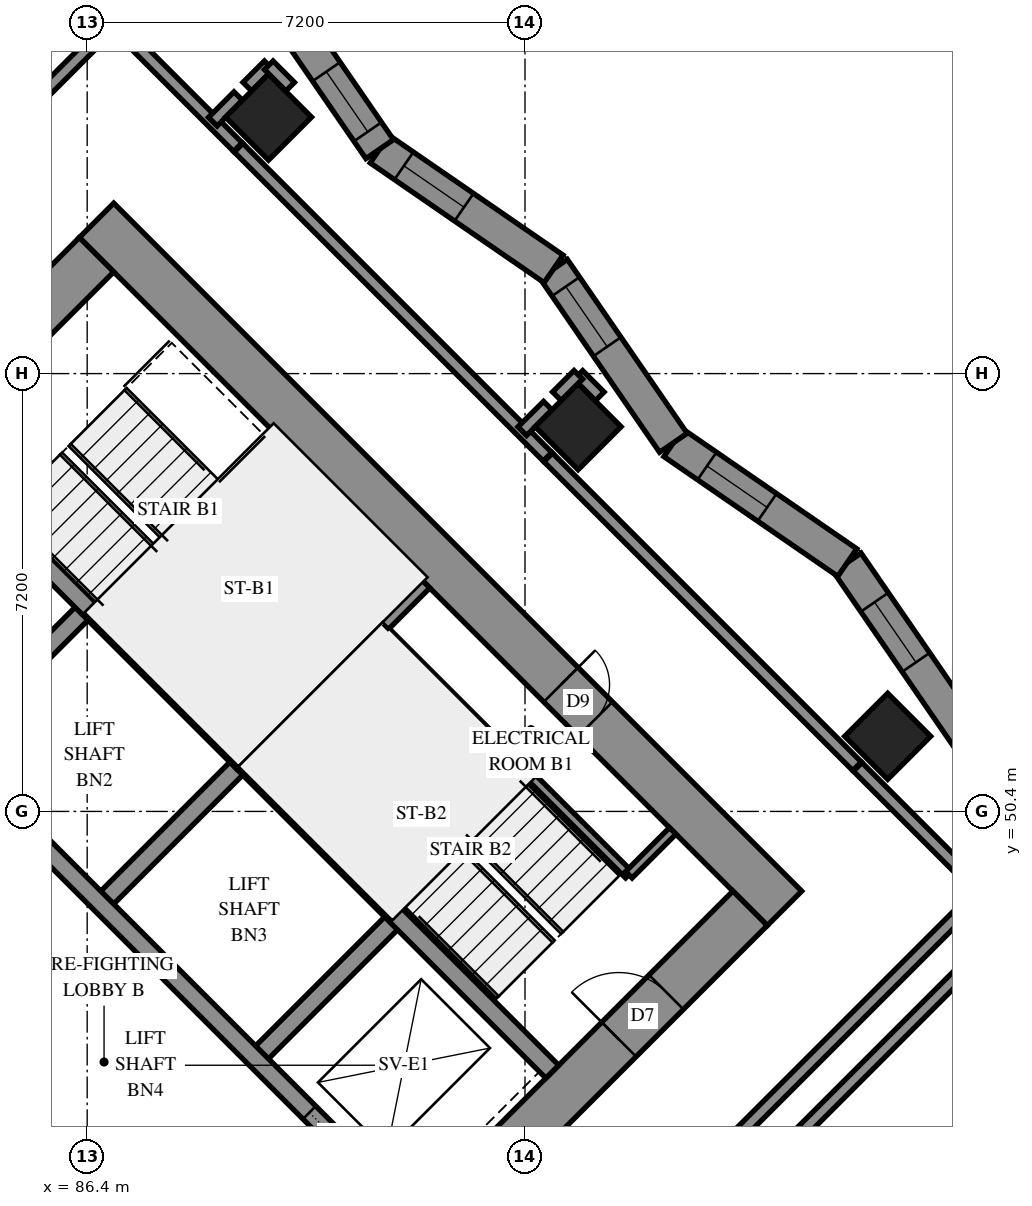
"""IFC4 building model, lengths in metres.
Left out: names, types, materials, properties, quantities, classifications, styles, units other than length and angle.
Written with IfcOpenShell. Run it as: python <this file> out.ifc"""

import sys

from ifc_helpers import new_model, si_unit, direction, frame, frame_2d, origin, origin_2d, place, context, subcontext, project, spatial, polyline, rectangle, outline, extrude, element, fill, save


model = new_model("IFC4")
c1 = context("Model", 3, precision=1e-05, world=origin(), true_north=direction((0.0, 1.0)))
c2 = subcontext(c1, "Body", "Model", "MODEL_VIEW")
j1 = project(units=[si_unit("LENGTHUNIT", "METRE"), si_unit("PLANEANGLEUNIT", "RADIAN")], contexts=[c1])
p1 = place(None, origin())
s1 = spatial("IfcSite", under=j1, at=p1, CompositionType="ELEMENT")
p2 = place(p1, origin())
s2 = spatial("IfcBuilding", under=s1, at=p2, CompositionType="ELEMENT")
p3 = place(p2, frame((0.0, 0.0, 118.6)))
s3 = spatial("IfcBuildingStorey", under=s2, at=p3, CompositionType="ELEMENT", Elevation=118.6)
for number, where, z_axis, x_axis in (
    (1, (89.382, 61.818, 0.0), (0.0, 0.0, 1.0), (0.707, -0.707, 0.0)),
    (2, (94.474, 56.727, 0.0), (0.0, 0.0, 1.0), (0.707, -0.707, 0.0)),
    (3, (99.565, 51.635, 0.0), (0.0, 0.0, 1.0), (0.707, -0.707, 0.0)),
):
    element("IfcColumn", number, at=place(p3, frame(where, z_axis=z_axis, x_axis=x_axis)), inside=s3, PredefinedType="COLUMN", context=c2, shape_type="SweptSolid", body=[
        extrude(rectangle(XDim=1.0, YDim=1.0, at=origin_2d()), origin(), (0.0, 0.0, 1.0), 3.1),
    ])
p4 = place(p3, frame((75.806, 49.373, -0.3), z_axis=(0.0, 0.0, 1.0), x_axis=(0.7071067812, -0.7071067812, 0.0)))
e4 = element("IfcWall", 4, at=p4, inside=s3, PredefinedType="SHEAR", context=c2, shape_type="SweptSolid", body=[
    extrude(rectangle(XDim=16.0, YDim=0.8, at=frame_2d((8.0, 0.0))), origin(), (0.0, 0.0, 1.0), 2.7),
])
p5 = place(p3, frame((86.554, 60.121, -0.3), z_axis=(0.0, 0.0, 1.0), x_axis=(0.7071067812, -0.7071067812, 0.0)))
e5 = element("IfcWall", 5, at=p5, inside=s3, PredefinedType="SHEAR", context=c2, shape_type="SweptSolid", body=[
    extrude(rectangle(XDim=16.0, YDim=0.8, at=frame_2d((8.0, 0.0))), origin(), (0.0, 0.0, 1.0), 2.7),
])
p6 = place(p5, frame((10.8, 0.0, 0.3)))
e6 = element("IfcOpeningElement", 6, at=p6, cuts=e5, PredefinedType="OPENING", context=c2, shape_type="SweptSolid", body=[
    extrude(rectangle(XDim=0.8, YDim=2.1, at=frame_2d((0.4, 1.05))), frame((0.0, 0.41, 0.0), z_axis=(0.0, -1.0, 0.0), x_axis=(1.0, 0.0, 0.0)), (0.0, 0.0, 1.0), 0.82),
])
p7 = place(p3, frame((76.372, 49.373, -0.3), z_axis=(0.0, 0.0, 1.0), x_axis=(0.7071067812, 0.7071067812, 0.0)))
e7 = element("IfcWall", 7, at=p7, inside=s3, PredefinedType="SHEAR", context=c2, shape_type="SweptSolid", body=[
    extrude(rectangle(XDim=14.4, YDim=0.8, at=frame_2d((7.2, 0.0))), origin(), (0.0, 0.0, 1.0), 2.7),
])
p8 = place(p7, frame((4.55, 0.0, 0.3)))
e8 = element("IfcOpeningElement", 8, at=p8, cuts=e7, PredefinedType="OPENING", context=c2, shape_type="SweptSolid", body=[
    extrude(rectangle(XDim=1.1, YDim=2.1, at=frame_2d((0.55, 1.05))), frame((0.0, 0.41, 0.0), z_axis=(0.0, -1.0, 0.0), x_axis=(1.0, 0.0, 0.0)), (0.0, 0.0, 1.0), 0.82),
])
p9 = place(p7, frame((11.35, 0.0, 0.3)))
e9 = element("IfcOpeningElement", 9, at=p9, cuts=e7, PredefinedType="OPENING", context=c2, shape_type="SweptSolid", body=[
    extrude(rectangle(XDim=1.1, YDim=2.1, at=frame_2d((0.55, 1.05))), frame((0.0, 0.41, 0.0), z_axis=(0.0, -1.0, 0.0), x_axis=(1.0, 0.0, 0.0)), (0.0, 0.0, 1.0), 0.82),
])
p10 = place(p3, frame((87.12, 38.625, -0.3), z_axis=(0.0, 0.0, 1.0), x_axis=(0.7071067812, 0.7071067812, 0.0)))
e10 = element("IfcWall", 10, at=p10, inside=s3, PredefinedType="SHEAR", context=c2, shape_type="SweptSolid", body=[
    extrude(rectangle(XDim=14.4, YDim=0.8, at=frame_2d((7.2, 0.0))), origin(), (0.0, 0.0, 1.0), 2.7),
])
p11 = place(p10, frame((4.55, 0.0, 0.3)))
e11 = element("IfcOpeningElement", 11, at=p11, cuts=e10, PredefinedType="OPENING", context=c2, shape_type="SweptSolid", body=[
    extrude(rectangle(XDim=1.1, YDim=2.1, at=frame_2d((0.55, 1.05))), frame((0.0, 0.41, 0.0), z_axis=(0.0, -1.0, 0.0), x_axis=(1.0, 0.0, 0.0)), (0.0, 0.0, 1.0), 0.82),
])
p12 = place(p10, frame((11.35, 0.0, 0.3)))
e12 = element("IfcOpeningElement", 12, at=p12, cuts=e10, PredefinedType="OPENING", context=c2, shape_type="SweptSolid", body=[
    extrude(rectangle(XDim=1.1, YDim=2.1, at=frame_2d((0.55, 1.05))), frame((0.0, 0.41, 0.0), z_axis=(0.0, -1.0, 0.0), x_axis=(1.0, 0.0, 0.0)), (0.0, 0.0, 1.0), 0.82),
])
p13 = place(p3, frame((84.079, 51.423, 0.0), z_axis=(0.0, 0.0, 1.0), x_axis=(0.7071219326, 0.7070916295, 0.0)))
e13 = element("IfcWall", 13, at=p13, inside=s3, PredefinedType="SOLIDWALL", context=c2, shape_type="SweptSolid", body=[
    extrude(rectangle(XDim=3.3, YDim=0.3, at=frame_2d((1.65, 0.0))), origin(), (0.0, 0.0, 1.0), 3.1),
])
for number, where, z_axis, x_axis in (
    (14, (86.625, 48.878, 0.0), (0.0, 0.0, 1.0), (0.707, 0.707, 0.0)),
    (15, (89.17, 46.332, 0.0), (0.0, 0.0, 1.0), (0.707, 0.707, 0.0)),
):
    element("IfcWall", number, at=place(p3, frame(where, z_axis=z_axis, x_axis=x_axis)), inside=s3, PredefinedType="SOLIDWALL", context=c2, shape_type="SweptSolid", body=[
        extrude(rectangle(XDim=3.3, YDim=0.3, at=frame_2d((1.65, 0.0))), origin(), (0.0, 0.0, 1.0), 3.1),
    ])
p14 = place(p3, frame((78.988, 51.423, 0.0), z_axis=(0.0, 0.0, 1.0), x_axis=(0.7071067812, -0.7071067812, 0.0)))
e16 = element("IfcWall", 16, at=p14, inside=s3, PredefinedType="SOLIDWALL", context=c2, shape_type="SweptSolid", body=[
    extrude(rectangle(XDim=14.4, YDim=0.3, at=frame_2d((7.2, 0.0))), origin(), (0.0, 0.0, 1.0), 3.1),
])
p15 = place(p14, frame((1.25, 0.0, 0.0)))
e17 = element("IfcOpeningElement", 17, at=p15, cuts=e16, PredefinedType="OPENING", context=c2, shape_type="SweptSolid", body=[
    extrude(rectangle(XDim=1.1, YDim=2.1, at=frame_2d((0.55, 1.05))), frame((0.0, 0.16, 0.0), z_axis=(0.0, -1.0, 0.0), x_axis=(1.0, 0.0, 0.0)), (0.0, 0.0, 1.0), 0.32),
])
p16 = place(p14, frame((4.85, 0.0, 0.0)))
e18 = element("IfcOpeningElement", 18, at=p16, cuts=e16, PredefinedType="OPENING", context=c2, shape_type="SweptSolid", body=[
    extrude(rectangle(XDim=1.1, YDim=2.1, at=frame_2d((0.55, 1.05))), frame((0.0, 0.16, 0.0), z_axis=(0.0, -1.0, 0.0), x_axis=(1.0, 0.0, 0.0)), (0.0, 0.0, 1.0), 0.32),
])
p17 = place(p14, frame((8.45, 0.0, 0.0)))
e19 = element("IfcOpeningElement", 19, at=p17, cuts=e16, PredefinedType="OPENING", context=c2, shape_type="SweptSolid", body=[
    extrude(rectangle(XDim=1.1, YDim=2.1, at=frame_2d((0.55, 1.05))), frame((0.0, 0.16, 0.0), z_axis=(0.0, -1.0, 0.0), x_axis=(1.0, 0.0, 0.0)), (0.0, 0.0, 1.0), 0.32),
])
p18 = place(p14, frame((12.05, 0.0, 0.0)))
e20 = element("IfcOpeningElement", 20, at=p18, cuts=e16, PredefinedType="OPENING", context=c2, shape_type="SweptSolid", body=[
    extrude(rectangle(XDim=1.1, YDim=2.1, at=frame_2d((0.55, 1.05))), frame((0.0, 0.16, 0.0), z_axis=(0.0, -1.0, 0.0), x_axis=(1.0, 0.0, 0.0)), (0.0, 0.0, 1.0), 0.32),
])
p19 = place(p3, frame((81.534, 53.969, 0.0), z_axis=(0.0, 0.0, 1.0), x_axis=(0.707103309, -0.7071102534, 0.0)))
e21 = element("IfcWall", 21, at=p19, inside=s3, PredefinedType="SOLIDWALL", context=c2, shape_type="SweptSolid", body=[
    extrude(rectangle(XDim=14.4, YDim=0.3, at=frame_2d((7.2, 0.0))), origin(), (0.0, 0.0, 1.0), 3.1),
])
p20 = place(p19, frame((12.05, 0.0, 0.0)))
e22 = element("IfcOpeningElement", 22, at=p20, cuts=e21, PredefinedType="OPENING", context=c2, shape_type="SweptSolid", body=[
    extrude(rectangle(XDim=1.1, YDim=2.1, at=frame_2d((0.55, 1.05))), frame((0.0, 0.16, 0.0), z_axis=(0.0, -1.0, 0.0), x_axis=(1.0, 0.0, 0.0)), (0.0, 0.0, 1.0), 0.32),
])
for number, where, z_axis, x_axis in (
    (23, (83.867, 56.302, 0.0), (0.0, 0.0, 1.0), (0.707, -0.707, 0.0)),
    (24, (88.958, 51.211, 0.0), (0.0, 0.0, 1.0), (0.707, -0.707, 0.0)),
):
    element("IfcWall", number, at=place(p3, frame(where, z_axis=z_axis, x_axis=x_axis)), inside=s3, PredefinedType="SOLIDWALL", context=c2, shape_type="SweptSolid", body=[
        extrude(rectangle(XDim=7.2, YDim=0.3, at=frame_2d((3.6, 0.0))), origin(), (0.0, 0.0, 1.0), 3.1),
    ])
p21 = place(p3, frame((88.958, 51.211, 0.0), z_axis=(0.0, 0.0, 1.0), x_axis=(0.7071067812, 0.7071067812, 0.0)))
e25 = element("IfcWall", 25, at=p21, inside=s3, PredefinedType="SOLIDWALL", context=c2, shape_type="SweptSolid", body=[
    extrude(rectangle(XDim=4.2, YDim=0.3, at=frame_2d((2.1, 0.0))), origin(), (0.0, 0.0, 1.0), 3.1),
])
p22 = place(p3, frame((100.869, 51.632, 0.0), z_axis=(0.0, 0.0, 1.0), x_axis=(-0.5670847596, 0.8236594414, 0.0)))
e26 = element("IfcWall", 26, at=p22, inside=s3, PredefinedType="SOLIDWALL", context=c2, shape_type="SweptSolid", body=[
    extrude(outline(polyline([(0.051, -0.275), (3.523, -0.275), (3.422, 0.275), (-0.051, 0.275), (0.051, -0.275)])), origin(), (0.0, 0.0, 1.0), 3.1),
])
p23 = place(p22, frame((1.481, 0.0, 0.5)))
e27 = element("IfcOpeningElement", 27, at=p23, cuts=e26, PredefinedType="OPENING", context=c2, shape_type="SweptSolid", body=[
    extrude(rectangle(XDim=1.2, YDim=2.45, at=frame_2d((0.6, 1.225))), frame((0.0, 0.285, 0.0), z_axis=(0.0, -1.0, 0.0), x_axis=(1.0, 0.0, 0.0)), (0.0, 0.0, 1.0), 0.57),
])
p24 = place(p3, frame((98.9, 54.492, 0.0), z_axis=(0.0, 0.0, 1.0), x_axis=(-0.8236594414, 0.5670847596, 0.0)))
e28 = element("IfcWall", 28, at=p24, inside=s3, PredefinedType="SOLIDWALL", context=c2, shape_type="SweptSolid", body=[
    extrude(outline(polyline([(-0.051, -0.275), (3.422, -0.275), (3.523, 0.275), (0.051, 0.275), (-0.051, -0.275)])), origin(), (0.0, 0.0, 1.0), 3.1),
])
p25 = place(p24, frame((1.601, 0.0, 0.5)))
e29 = element("IfcOpeningElement", 29, at=p25, cuts=e28, PredefinedType="OPENING", context=c2, shape_type="SweptSolid", body=[
    extrude(rectangle(XDim=1.2, YDim=2.45, at=frame_2d((0.6, 1.225))), frame((0.0, 0.285, 0.0), z_axis=(0.0, -1.0, 0.0), x_axis=(1.0, 0.0, 0.0)), (0.0, 0.0, 1.0), 0.57),
])
p26 = place(p3, frame((96.04, 56.462, 0.0), z_axis=(0.0, 0.0, 1.0), x_axis=(-0.5670847596, 0.8236594414, 0.0)))
e30 = element("IfcWall", 30, at=p26, inside=s3, PredefinedType="SOLIDWALL", context=c2, shape_type="SweptSolid", body=[
    extrude(outline(polyline([(0.051, -0.275), (3.523, -0.275), (3.422, 0.275), (-0.051, 0.275), (0.051, -0.275)])), origin(), (0.0, 0.0, 1.0), 3.1),
])
p27 = place(p26, frame((1.919, 0.0, 0.5)))
e31 = element("IfcOpeningElement", 31, at=p27, cuts=e30, PredefinedType="OPENING", context=c2, shape_type="SweptSolid", body=[
    extrude(rectangle(XDim=1.2, YDim=2.45, at=frame_2d((0.6, 1.225))), frame((0.0, 0.285, 0.0), z_axis=(0.0, -1.0, 0.0), x_axis=(1.0, 0.0, 0.0)), (0.0, 0.0, 1.0), 0.57),
])
p28 = place(p3, frame((94.07, 59.322, 0.0), z_axis=(0.0, 0.0, 1.0), x_axis=(-0.8236459911, 0.567104295, 0.0)))
e32 = element("IfcWall", 32, at=p28, inside=s3, PredefinedType="SOLIDWALL", context=c2, shape_type="SweptSolid", body=[
    extrude(outline(polyline([(-0.051, -0.275), (3.422, -0.275), (3.523, 0.275), (0.051, 0.275), (-0.051, -0.275)])), origin(), (0.0, 0.0, 1.0), 3.1),
])
p29 = place(p28, frame((1.789, 0.0, 0.5)))
e33 = element("IfcOpeningElement", 33, at=p29, cuts=e32, PredefinedType="OPENING", context=c2, shape_type="SweptSolid", body=[
    extrude(rectangle(XDim=1.2, YDim=2.45, at=frame_2d((0.6, 1.225))), frame((0.0, 0.285, 0.0), z_axis=(0.0, -1.0, 0.0), x_axis=(1.0, 0.0, 0.0)), (0.0, 0.0, 1.0), 0.57),
])
p30 = place(p3, frame((91.21, 61.291, 0.0), z_axis=(0.0, 0.0, 1.0), x_axis=(-0.5670847596, 0.8236594414, 0.0)))
e34 = element("IfcWall", 34, at=p30, inside=s3, PredefinedType="SOLIDWALL", context=c2, shape_type="SweptSolid", body=[
    extrude(outline(polyline([(0.051, -0.275), (3.523, -0.275), (3.422, 0.275), (-0.051, 0.275), (0.051, -0.275)])), origin(), (0.0, 0.0, 1.0), 3.1),
])
p31 = place(p30, frame((0.346, 0.0, 0.5)))
e35 = element("IfcOpeningElement", 35, at=p31, cuts=e34, PredefinedType="OPENING", context=c2, shape_type="SweptSolid", body=[
    extrude(rectangle(XDim=1.2, YDim=2.45, at=frame_2d((0.6, 1.225))), frame((0.0, 0.285, 0.0), z_axis=(0.0, -1.0, 0.0), x_axis=(1.0, 0.0, 0.0)), (0.0, 0.0, 1.0), 0.57),
])
p32 = place(p30, frame((2.347, 0.0, 0.45)))
e36 = element("IfcOpeningElement", 36, at=p32, cuts=e34, PredefinedType="OPENING", context=c2, shape_type="SweptSolid", body=[
    extrude(rectangle(XDim=0.8, YDim=2.5, at=frame_2d((0.4, 1.25))), frame((0.0, 0.285, 0.0), z_axis=(0.0, -1.0, 0.0), x_axis=(1.0, 0.0, 0.0)), (0.0, 0.0, 1.0), 0.57),
])
p33 = place(p3, frame((91.313, 53.354, 0.0), z_axis=(0.0, 0.0, 1.0), x_axis=(0.7071067812, -0.7071067812, 0.0)))
e37 = element("IfcWall", 37, at=p33, inside=s3, PredefinedType="PARTITIONING", context=c2, shape_type="SweptSolid", body=[
    extrude(rectangle(XDim=5.65, YDim=0.15, at=frame_2d((2.825, 0.0))), origin(), (0.0, 0.0, 1.0), 3.1),
])
p34 = place(p3, frame((95.308, 49.358, 0.0), z_axis=(0.0, 0.0, 1.0), x_axis=(0.70705776, 0.707155799, 0.0)))
e38 = element("IfcWall", 38, at=p34, inside=s3, PredefinedType="PARTITIONING", context=c2, shape_type="SweptSolid", body=[
    extrude(rectangle(XDim=1.02, YDim=0.15, at=frame_2d((0.51, 0.0))), origin(), (0.0, 0.0, 1.0), 3.1),
])
p35 = place(p3, frame((80.949, 58.477, 0.0), z_axis=(0.0, 0.0, 1.0), x_axis=(0.7071121838, 0.7071013786, 0.0)))
e39 = element("IfcWall", 39, at=p35, inside=s3, PredefinedType="PARTITIONING", context=c2, shape_type="SweptSolid", body=[
    extrude(rectangle(XDim=9.255, YDim=0.2, at=frame_2d((4.627, 0.0))), origin(), (0.0, 0.0, 1.0), 3.1),
])
p36 = place(p3, frame((81.322, 57.858, 0.0), z_axis=(0.0, 0.0, 1.0), x_axis=(0.7069785544, 0.7072349848, 0.0)))
e40 = element("IfcWall", 40, at=p36, inside=s3, PredefinedType="PARTITIONING", context=c2, shape_type="SweptSolid", body=[
    extrude(rectangle(XDim=7.799, YDim=0.2, at=frame_2d((3.9, 0.0))), origin(), (0.0, 0.0, 1.0), 3.1),
])
p37 = place(p3, frame((95.606, 43.577, 0.0), z_axis=(0.0, 0.0, 1.0), x_axis=(0.7071067812, 0.7071067812, 0.0)))
e41 = element("IfcWall", 41, at=p37, inside=s3, PredefinedType="PARTITIONING", context=c2, shape_type="SweptSolid", body=[
    extrude(rectangle(XDim=7.798, YDim=0.2, at=frame_2d((3.899, 0.0))), origin(), (0.0, 0.0, 1.0), 3.1),
])
p38 = place(p3, frame((88.889, 61.315, 0.0), z_axis=(0.0, 0.0, 1.0), x_axis=(0.7071067812, -0.7071067812, 0.0)))
e42 = element("IfcWall", 42, at=p38, inside=s3, PredefinedType="PARTITIONING", context=c2, shape_type="SweptSolid", body=[
    extrude(rectangle(XDim=7.187, YDim=0.2, at=frame_2d((3.594, 0.0))), origin(), (0.0, 0.0, 1.0), 3.1),
])
p39 = place(p3, frame((97.795, 44.777, 0.0), z_axis=(0.0, 0.0, 1.0), x_axis=(0.7071136921, 0.7070998702, 0.0)))
e43 = element("IfcWall", 43, at=p39, inside=s3, PredefinedType="PARTITIONING", context=c2, shape_type="SweptSolid", body=[
    extrude(rectangle(XDim=7.235, YDim=0.2, at=frame_2d((3.617, 0.0))), origin(), (0.0, 0.0, 1.0), 3.1),
])
p40 = place(p3, frame((93.981, 56.223, 0.0), z_axis=(0.0, 0.0, 1.0), x_axis=(0.7071067812, -0.7071067812, 0.0)))
e44 = element("IfcWall", 44, at=p40, inside=s3, PredefinedType="PARTITIONING", context=c2, shape_type="SweptSolid", body=[
    extrude(rectangle(XDim=7.184, YDim=0.2, at=frame_2d((3.592, 0.0))), origin(), (0.0, 0.0, 1.0), 3.1),
])
p41 = place(p3, frame((100.063, 41.953, 0.0), z_axis=(0.0, 0.0, 1.0), x_axis=(0.7071067812, 0.7071067812, 0.0)))
e45 = element("IfcWall", 45, at=p41, inside=s3, PredefinedType="PARTITIONING", context=c2, shape_type="SweptSolid", body=[
    extrude(rectangle(XDim=5.787, YDim=0.2, at=frame_2d((2.893, 0.0))), origin(), (0.0, 0.0, 1.0), 3.1),
])
for number, where, z_axis, x_axis in (
    (46, (86.833, 63.371, 0.0), (0.0, 0.0, 1.0), (0.707, -0.707, 0.0)),
    (47, (99.071, 51.133, 0.0), (0.0, 0.0, 1.0), (0.707, -0.707, 0.0)),
):
    element("IfcWall", number, at=place(p3, frame(where, z_axis=z_axis, x_axis=x_axis)), inside=s3, PredefinedType="PARTITIONING", context=c2, shape_type="SweptSolid", body=[
        extrude(rectangle(XDim=2.893, YDim=0.2, at=frame_2d((1.447, 0.0))), origin(), (0.0, 0.0, 1.0), 3.1),
    ])
for number, where, z_axis, x_axis in (
    (48, (93.556, 56.654, 0.0), (0.0, 0.0, 1.0), (0.709, 0.705, 0.0)),
    (49, (88.467, 61.743, 0.0), (0.0, 0.0, 1.0), (0.705, 0.709, 0.0)),
):
    element("IfcWall", number, at=place(p3, frame(where, z_axis=z_axis, x_axis=x_axis)), inside=s3, PredefinedType="PARTITIONING", context=c2, shape_type="SweptSolid", body=[
        extrude(rectangle(XDim=0.593, YDim=0.2, at=frame_2d((0.296, 0.0))), origin(), (0.0, 0.0, 1.0), 3.1),
    ])
for number, where, z_axis, x_axis in (
    (50, (94.478, 57.578, 0.0), (0.0, 0.0, 1.0), (0.707, -0.707, 0.0)),
    (51, (89.033, 62.319, 0.0), (0.0, 0.0, 1.0), (0.707, 0.707, 0.0)),
    (52, (89.386, 62.67, 0.0), (0.0, 0.0, 1.0), (0.707, -0.707, 0.0)),
    (53, (94.124, 57.228, 0.0), (0.0, 0.0, 1.0), (0.707, 0.707, 0.0)),
):
    element("IfcWall", number, at=place(p3, frame(where, z_axis=z_axis, x_axis=x_axis)), inside=s3, PredefinedType="PARTITIONING", context=c2, shape_type="SweptSolid", body=[
        extrude(rectangle(XDim=0.498, YDim=0.2, at=frame_2d((0.249, 0.0))), origin(), (0.0, 0.0, 1.0), 3.1),
    ])
p42 = place(p23, origin())
e54 = element("IfcWindow", 54, at=p42, inside=s3, PartitioningType="SINGLE_PANEL", PredefinedType="WINDOW", context=c2, shape_type="SweptSolid", body=[
    extrude(rectangle(XDim=1.2, YDim=2.45, at=frame_2d((0.6, 1.225))), frame((0.0, 0.155, 0.0), z_axis=(0.0, -1.0, 0.0), x_axis=(1.0, 0.0, 0.0)), (0.0, 0.0, 1.0), 0.06),
])
fill(e27, e54)
p43 = place(p25, origin())
e55 = element("IfcWindow", 55, at=p43, inside=s3, PartitioningType="SINGLE_PANEL", PredefinedType="WINDOW", context=c2, shape_type="SweptSolid", body=[
    extrude(rectangle(XDim=1.2, YDim=2.45, at=frame_2d((0.6, 1.225))), frame((0.0, 0.155, 0.0), z_axis=(0.0, -1.0, 0.0), x_axis=(1.0, 0.0, 0.0)), (0.0, 0.0, 1.0), 0.06),
])
fill(e29, e55)
p44 = place(p27, origin())
e56 = element("IfcWindow", 56, at=p44, inside=s3, PartitioningType="SINGLE_PANEL", PredefinedType="WINDOW", context=c2, shape_type="SweptSolid", body=[
    extrude(rectangle(XDim=1.2, YDim=2.45, at=frame_2d((0.6, 1.225))), frame((0.0, 0.155, 0.0), z_axis=(0.0, -1.0, 0.0), x_axis=(1.0, 0.0, 0.0)), (0.0, 0.0, 1.0), 0.06),
])
fill(e31, e56)
p45 = place(p29, origin())
e57 = element("IfcWindow", 57, at=p45, inside=s3, PartitioningType="SINGLE_PANEL", PredefinedType="WINDOW", context=c2, shape_type="SweptSolid", body=[
    extrude(rectangle(XDim=1.2, YDim=2.45, at=frame_2d((0.6, 1.225))), frame((0.0, 0.155, 0.0), z_axis=(0.0, -1.0, 0.0), x_axis=(1.0, 0.0, 0.0)), (0.0, 0.0, 1.0), 0.06),
])
fill(e33, e57)
p46 = place(p31, origin())
e58 = element("IfcWindow", 58, at=p46, inside=s3, PartitioningType="SINGLE_PANEL", PredefinedType="WINDOW", context=c2, shape_type="SweptSolid", body=[
    extrude(rectangle(XDim=1.2, YDim=2.45, at=frame_2d((0.6, 1.225))), frame((0.0, 0.155, 0.0), z_axis=(0.0, -1.0, 0.0), x_axis=(1.0, 0.0, 0.0)), (0.0, 0.0, 1.0), 0.06),
])
fill(e35, e58)
p47 = place(p6, origin())
e59 = element("IfcDoor", 59, at=p47, inside=s3, OperationType="SINGLE_SWING_RIGHT", PredefinedType="DOOR", context=c2, shape_type="SweptSolid", body=[
    extrude(rectangle(XDim=0.8, YDim=2.1, at=frame_2d((0.4, 1.05))), frame((0.0, -0.34, 0.0), z_axis=(0.0, -1.0, 0.0), x_axis=(1.0, 0.0, 0.0)), (0.0, 0.0, 1.0), 0.05),
])
fill(e6, e59)
p48 = place(p12, origin())
e60 = element("IfcDoor", 60, at=p48, inside=s3, OperationType="SINGLE_SWING_RIGHT", PredefinedType="DOOR", context=c2, shape_type="SweptSolid", body=[
    extrude(rectangle(XDim=1.1, YDim=2.1, at=frame_2d((0.55, 1.05))), frame((0.0, 0.025, 0.0), z_axis=(0.0, -1.0, 0.0), x_axis=(1.0, 0.0, 0.0)), (0.0, 0.0, 1.0), 0.05),
])
fill(e12, e60)
p49 = place(p20, origin())
e61 = element("IfcDoor", 61, at=p49, inside=s3, OperationType="SLIDING_TO_RIGHT", PredefinedType="DOOR", context=c2, shape_type="SweptSolid", body=[
    extrude(rectangle(XDim=1.1, YDim=2.1, at=frame_2d((0.55, 1.05))), frame((0.0, 0.025, 0.0), z_axis=(0.0, -1.0, 0.0), x_axis=(1.0, 0.0, 0.0)), (0.0, 0.0, 1.0), 0.05),
])
fill(e22, e61)
save(model, sys.argv[1])
